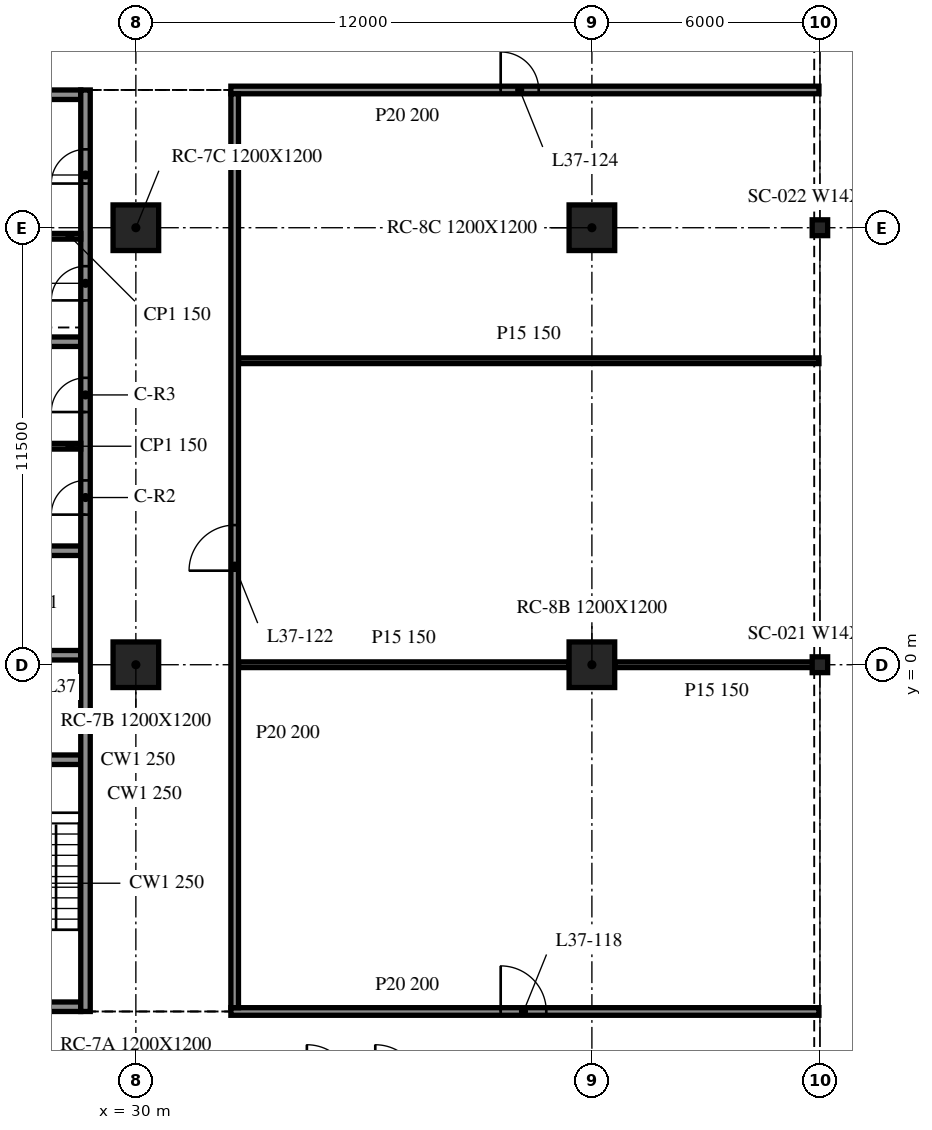
"""IFC4 building model, lengths in metres.
Left out: names, types, materials, properties, quantities, classifications, styles, units other than length and angle.
Written with IfcOpenShell. Run it as: python <this file> out.ifc"""

import sys

from ifc_helpers import new_model, si_unit, direction, frame, frame_2d, origin, origin_2d, place, context, subcontext, project, spatial, rectangle, i_section, extrude, element, fill, save


model = new_model("IFC4")
c1 = context("Model", 3, precision=1e-05, world=origin(), true_north=direction((0.0, 1.0)))
c2 = subcontext(c1, "Body", "Model", "MODEL_VIEW")
j1 = project(units=[si_unit("LENGTHUNIT", "METRE"), si_unit("PLANEANGLEUNIT", "RADIAN")], contexts=[c1])
p1 = place(None, origin())
s1 = spatial("IfcSite", under=j1, at=p1, CompositionType="ELEMENT")
p2 = place(p1, origin())
s2 = spatial("IfcBuilding", under=s1, at=p2, CompositionType="ELEMENT")
p3 = place(p2, frame((0.0, 0.0, 159.2)))
s3 = spatial("IfcBuildingStorey", under=s2, at=p3, CompositionType="ELEMENT", Elevation=159.2)
for number, where, z_axis, x_axis in (
    (1, (30.0, 0.0, -0.34), (0.0, 0.0, 1.0), (1.0, 0.0, 0.0)),
    (2, (30.0, 11.5, -0.34), (0.0, 0.0, 1.0), (1.0, 0.0, 0.0)),
    (3, (42.0, 0.0, -0.34), (0.0, 0.0, 1.0), (1.0, 0.0, 0.0)),
    (4, (42.0, 11.5, -0.34), (0.0, 0.0, 1.0), (1.0, 0.0, 0.0)),
):
    element("IfcColumn", number, at=place(p3, frame(where, z_axis=z_axis, x_axis=x_axis)), inside=s3, PredefinedType="COLUMN", context=c2, shape_type="SweptSolid", body=[
        extrude(rectangle(XDim=1.2, YDim=1.2, at=origin_2d()), origin(), (0.0, 0.0, 1.0), 3.8),
    ])
for number, where, z_axis, x_axis in (
    (5, (48.0, 0.0, -0.34), (0.0, 0.0, 1.0), (1.0, 0.0, 0.0)),
    (6, (48.0, 11.5, -0.34), (0.0, 0.0, 1.0), (1.0, 0.0, 0.0)),
):
    element("IfcColumn", number, at=place(p3, frame(where, z_axis=z_axis, x_axis=x_axis)), inside=s3, PredefinedType="COLUMN", context=c2, shape_type="SweptSolid", body=[
        extrude(i_section(OverallWidth=0.406, OverallDepth=0.417, WebThickness=0.03, FlangeThickness=0.048, at=origin_2d()), origin(), (0.0, 0.0, 1.0), 3.8),
    ])
p4 = place(p3, frame((28.675, -9.125, 0.0), z_axis=(0.0, 0.0, 1.0), x_axis=(0.0, 1.0, 0.0)))
e7 = element("IfcWall", 7, at=p4, inside=s3, PredefinedType="SOLIDWALL", context=c2, shape_type="SweptSolid", body=[
    extrude(rectangle(XDim=24.25, YDim=0.25, at=frame_2d((12.125, 0.0))), origin(), (0.0, 0.0, 1.0), 3.46),
])
p5 = place(p4, frame((13.075, 0.0, 0.0)))
e8 = element("IfcOpeningElement", 8, at=p5, cuts=e7, PredefinedType="OPENING", context=c2, shape_type="SweptSolid", body=[
    extrude(rectangle(XDim=0.9, YDim=2.1, at=frame_2d((0.45, 1.05))), frame((0.0, 0.135, 0.0), z_axis=(0.0, -1.0, 0.0), x_axis=(1.0, 0.0, 0.0)), (0.0, 0.0, 1.0), 0.27),
])
p6 = place(p4, frame((15.775, 0.0, 0.0)))
e9 = element("IfcOpeningElement", 9, at=p6, cuts=e7, PredefinedType="OPENING", context=c2, shape_type="SweptSolid", body=[
    extrude(rectangle(XDim=0.9, YDim=2.1, at=frame_2d((0.45, 1.05))), frame((0.0, 0.135, 0.0), z_axis=(0.0, -1.0, 0.0), x_axis=(1.0, 0.0, 0.0)), (0.0, 0.0, 1.0), 0.27),
])
p7 = place(p4, frame((18.712, 0.0, 0.0)))
e10 = element("IfcOpeningElement", 10, at=p7, cuts=e7, PredefinedType="OPENING", context=c2, shape_type="SweptSolid", body=[
    extrude(rectangle(XDim=0.9, YDim=2.1, at=frame_2d((0.45, 1.05))), frame((0.0, 0.135, 0.0), z_axis=(0.0, -1.0, 0.0), x_axis=(1.0, 0.0, 0.0)), (0.0, 0.0, 1.0), 0.27),
])
p8 = place(p4, frame((21.788, 0.0, 0.0)))
e11 = element("IfcOpeningElement", 11, at=p8, cuts=e7, PredefinedType="OPENING", context=c2, shape_type="SweptSolid", body=[
    extrude(rectangle(XDim=0.9, YDim=2.1, at=frame_2d((0.45, 1.05))), frame((0.0, 0.135, 0.0), z_axis=(0.0, -1.0, 0.0), x_axis=(1.0, 0.0, 0.0)), (0.0, 0.0, 1.0), 0.27),
])
p9 = place(p3, frame((28.55, -9.0, 0.0), z_axis=(0.0, 0.0, 1.0), x_axis=(-1.0, 0.0, 0.0)))
e12 = element("IfcWall", 12, at=p9, inside=s3, PredefinedType="SOLIDWALL", context=c2, shape_type="SweptSolid", body=[
    extrude(rectangle(XDim=9.1, YDim=0.25, at=frame_2d((4.55, 0.0))), origin(), (0.0, 0.0, 1.0), 3.46),
])
p10 = place(p9, frame((3.65, 0.0, 0.0)))
e13 = element("IfcOpeningElement", 13, at=p10, cuts=e12, PredefinedType="OPENING", context=c2, shape_type="SweptSolid", body=[
    extrude(rectangle(XDim=1.8, YDim=2.1, at=frame_2d((0.9, 1.05))), frame((0.0, 0.135, 0.0), z_axis=(0.0, -1.0, 0.0), x_axis=(1.0, 0.0, 0.0)), (0.0, 0.0, 1.0), 0.27),
])
p11 = place(p3, frame((19.45, 15.0, 0.0), z_axis=(0.0, 0.0, 1.0), x_axis=(1.0, 0.0, 0.0)))
e14 = element("IfcWall", 14, at=p11, inside=s3, PredefinedType="SOLIDWALL", context=c2, shape_type="SweptSolid", body=[
    extrude(rectangle(XDim=9.1, YDim=0.25, at=frame_2d((4.55, 0.0))), origin(), (0.0, 0.0, 1.0), 3.46),
])
p12 = place(p11, frame((3.65, 0.0, 0.0)))
e15 = element("IfcOpeningElement", 15, at=p12, cuts=e14, PredefinedType="OPENING", context=c2, shape_type="SweptSolid", body=[
    extrude(rectangle(XDim=1.8, YDim=2.1, at=frame_2d((0.9, 1.05))), frame((0.0, 0.135, 0.0), z_axis=(0.0, -1.0, 0.0), x_axis=(1.0, 0.0, 0.0)), (0.0, 0.0, 1.0), 0.27),
])
for number, where, z_axis, x_axis in (
    (16, (25.7, -2.5, 0.0), (0.0, 0.0, 1.0), (1.0, 0.0, 0.0)),
    (17, (25.7, 0.25, 0.0), (0.0, 0.0, 1.0), (1.0, 0.0, 0.0)),
    (18, (25.7, 3.0, 0.0), (0.0, 0.0, 1.0), (1.0, 0.0, 0.0)),
    (19, (25.7, 8.5, 0.0), (0.0, 0.0, 1.0), (1.0, 0.0, 0.0)),
):
    element("IfcWall", number, at=place(p3, frame(where, z_axis=z_axis, x_axis=x_axis)), inside=s3, PredefinedType="SOLIDWALL", context=c2, shape_type="SweptSolid", body=[
        extrude(rectangle(XDim=2.85, YDim=0.25, at=frame_2d((1.425, 0.0))), origin(), (0.0, 0.0, 1.0), 3.46),
    ])
for number, where, z_axis, x_axis in (
    (20, (25.7, 5.75, 0.0), (0.0, 0.0, 1.0), (1.0, 0.0, 0.0)),
    (21, (25.7, 11.275, 0.0), (0.0, 0.0, 1.0), (1.0, 0.0, 0.0)),
):
    element("IfcWall", number, at=place(p3, frame(where, z_axis=z_axis, x_axis=x_axis)), inside=s3, PredefinedType="PARTITIONING", context=c2, shape_type="SweptSolid", body=[
        extrude(rectangle(XDim=2.85, YDim=0.15, at=frame_2d((1.425, 0.0))), origin(), (0.0, 0.0, 1.0), 3.46),
    ])
p13 = place(p3, frame((32.5, -9.125, 0.0), z_axis=(0.0, 0.0, 1.0), x_axis=(1.0, 0.0, 0.0)))
e22 = element("IfcWall", 22, at=p13, inside=s3, PredefinedType="PARTITIONING", context=c2, shape_type="SweptSolid", body=[
    extrude(rectangle(XDim=15.475, YDim=0.2, at=frame_2d((7.738, 0.0))), origin(), (0.0, 0.0, 1.0), 3.46),
])
p14 = place(p13, frame((7.1, 0.0, 0.0)))
e23 = element("IfcOpeningElement", 23, at=p14, cuts=e22, PredefinedType="OPENING", context=c2, shape_type="SweptSolid", body=[
    extrude(rectangle(XDim=1.2, YDim=2.1, at=frame_2d((0.6, 1.05))), frame((0.0, 0.11, 0.0), z_axis=(0.0, -1.0, 0.0), x_axis=(1.0, 0.0, 0.0)), (0.0, 0.0, 1.0), 0.22),
])
p15 = place(p3, frame((32.7, 0.0, 0.0), z_axis=(0.0, 0.0, 1.0), x_axis=(1.0, 0.0, 0.0)))
e24 = element("IfcWall", 24, at=p15, inside=s3, PredefinedType="PARTITIONING", context=c2, shape_type="SweptSolid", body=[
    extrude(rectangle(XDim=8.7, YDim=0.15, at=frame_2d((4.35, 0.0))), origin(), (0.0, 0.0, 1.0), 3.46),
])
p16 = place(p3, frame((42.6, 0.0, 0.0), z_axis=(0.0, 0.0, 1.0), x_axis=(1.0, 0.0, 0.0)))
e25 = element("IfcWall", 25, at=p16, inside=s3, PredefinedType="PARTITIONING", context=c2, shape_type="SweptSolid", body=[
    extrude(rectangle(XDim=5.375, YDim=0.15, at=frame_2d((2.688, 0.0))), origin(), (0.0, 0.0, 1.0), 3.46),
])
p17 = place(p3, frame((32.7, 8.0, 0.0), z_axis=(0.0, 0.0, 1.0), x_axis=(1.0, 0.0, 0.0)))
e26 = element("IfcWall", 26, at=p17, inside=s3, PredefinedType="PARTITIONING", context=c2, shape_type="SweptSolid", body=[
    extrude(rectangle(XDim=15.275, YDim=0.15, at=frame_2d((7.638, 0.0))), origin(), (0.0, 0.0, 1.0), 3.46),
])
p18 = place(p3, frame((32.5, 15.125, 0.0), z_axis=(0.0, 0.0, 1.0), x_axis=(1.0, 0.0, 0.0)))
e27 = element("IfcWall", 27, at=p18, inside=s3, PredefinedType="PARTITIONING", context=c2, shape_type="SweptSolid", body=[
    extrude(rectangle(XDim=15.475, YDim=0.2, at=frame_2d((7.738, 0.0))), origin(), (0.0, 0.0, 1.0), 3.46),
])
p19 = place(p18, frame((7.1, 0.0, 0.0)))
e28 = element("IfcOpeningElement", 28, at=p19, cuts=e27, PredefinedType="OPENING", context=c2, shape_type="SweptSolid", body=[
    extrude(rectangle(XDim=1.0, YDim=2.1, at=frame_2d((0.5, 1.05))), frame((0.0, 0.11, 0.0), z_axis=(0.0, -1.0, 0.0), x_axis=(1.0, 0.0, 0.0)), (0.0, 0.0, 1.0), 0.22),
])
p20 = place(p3, frame((32.6, -9.025, 0.0), z_axis=(0.0, 0.0, 1.0), x_axis=(0.0, 1.0, 0.0)))
e29 = element("IfcWall", 29, at=p20, inside=s3, PredefinedType="PARTITIONING", context=c2, shape_type="SweptSolid", body=[
    extrude(rectangle(XDim=24.05, YDim=0.2, at=frame_2d((12.025, 0.0))), origin(), (0.0, 0.0, 1.0), 3.46),
])
p21 = place(p20, frame((11.5, 0.0, 0.0)))
e30 = element("IfcOpeningElement", 30, at=p21, cuts=e29, PredefinedType="OPENING", context=c2, shape_type="SweptSolid", body=[
    extrude(rectangle(XDim=1.2, YDim=2.1, at=frame_2d((0.6, 1.05))), frame((0.0, 0.11, 0.0), z_axis=(0.0, -1.0, 0.0), x_axis=(1.0, 0.0, 0.0)), (0.0, 0.0, 1.0), 0.22),
])
p22 = place(p5, origin())
e31 = element("IfcDoor", 31, at=p22, inside=s3, OperationType="SINGLE_SWING_RIGHT", PredefinedType="DOOR", context=c2, shape_type="SweptSolid", body=[
    extrude(rectangle(XDim=0.9, YDim=2.1, at=frame_2d((0.45, 1.05))), frame((0.0, 0.025, 0.0), z_axis=(0.0, -1.0, 0.0), x_axis=(1.0, 0.0, 0.0)), (0.0, 0.0, 1.0), 0.05),
])
fill(e8, e31)
p23 = place(p6, origin())
e32 = element("IfcDoor", 32, at=p23, inside=s3, OperationType="SINGLE_SWING_LEFT", PredefinedType="DOOR", context=c2, shape_type="SweptSolid", body=[
    extrude(rectangle(XDim=0.9, YDim=2.1, at=frame_2d((0.45, 1.05))), frame((0.0, 0.025, 0.0), z_axis=(0.0, -1.0, 0.0), x_axis=(1.0, 0.0, 0.0)), (0.0, 0.0, 1.0), 0.05),
])
fill(e9, e32)
p24 = place(p7, origin())
e33 = element("IfcDoor", 33, at=p24, inside=s3, OperationType="SINGLE_SWING_LEFT", PredefinedType="DOOR", context=c2, shape_type="SweptSolid", body=[
    extrude(rectangle(XDim=0.9, YDim=2.1, at=frame_2d((0.45, 1.05))), frame((0.0, 0.025, 0.0), z_axis=(0.0, -1.0, 0.0), x_axis=(1.0, 0.0, 0.0)), (0.0, 0.0, 1.0), 0.05),
])
fill(e10, e33)
p25 = place(p8, origin())
e34 = element("IfcDoor", 34, at=p25, inside=s3, OperationType="SINGLE_SWING_RIGHT", PredefinedType="DOOR", context=c2, shape_type="SweptSolid", body=[
    extrude(rectangle(XDim=0.9, YDim=2.1, at=frame_2d((0.45, 1.05))), frame((0.0, 0.025, 0.0), z_axis=(0.0, -1.0, 0.0), x_axis=(1.0, 0.0, 0.0)), (0.0, 0.0, 1.0), 0.05),
])
fill(e11, e34)
p26 = place(p14, origin())
e35 = element("IfcDoor", 35, at=p26, inside=s3, OperationType="SINGLE_SWING_RIGHT", PredefinedType="DOOR", context=c2, shape_type="SweptSolid", body=[
    extrude(rectangle(XDim=1.2, YDim=2.1, at=frame_2d((0.6, 1.05))), frame((0.0, 0.025, 0.0), z_axis=(0.0, -1.0, 0.0), x_axis=(1.0, 0.0, 0.0)), (0.0, 0.0, 1.0), 0.05),
])
fill(e23, e35)
p27 = place(p21, origin())
e36 = element("IfcDoor", 36, at=p27, inside=s3, OperationType="SINGLE_SWING_LEFT", PredefinedType="DOOR", context=c2, shape_type="SweptSolid", body=[
    extrude(rectangle(XDim=1.2, YDim=2.1, at=frame_2d((0.6, 1.05))), frame((0.0, 0.025, 0.0), z_axis=(0.0, -1.0, 0.0), x_axis=(1.0, 0.0, 0.0)), (0.0, 0.0, 1.0), 0.05),
])
fill(e30, e36)
p28 = place(p19, origin())
e37 = element("IfcDoor", 37, at=p28, inside=s3, OperationType="SINGLE_SWING_RIGHT", PredefinedType="DOOR", context=c2, shape_type="SweptSolid", body=[
    extrude(rectangle(XDim=1.0, YDim=2.1, at=frame_2d((0.5, 1.05))), frame((0.0, 0.025, 0.0), z_axis=(0.0, -1.0, 0.0), x_axis=(1.0, 0.0, 0.0)), (0.0, 0.0, 1.0), 0.05),
])
fill(e28, e37)
save(model, sys.argv[1])
